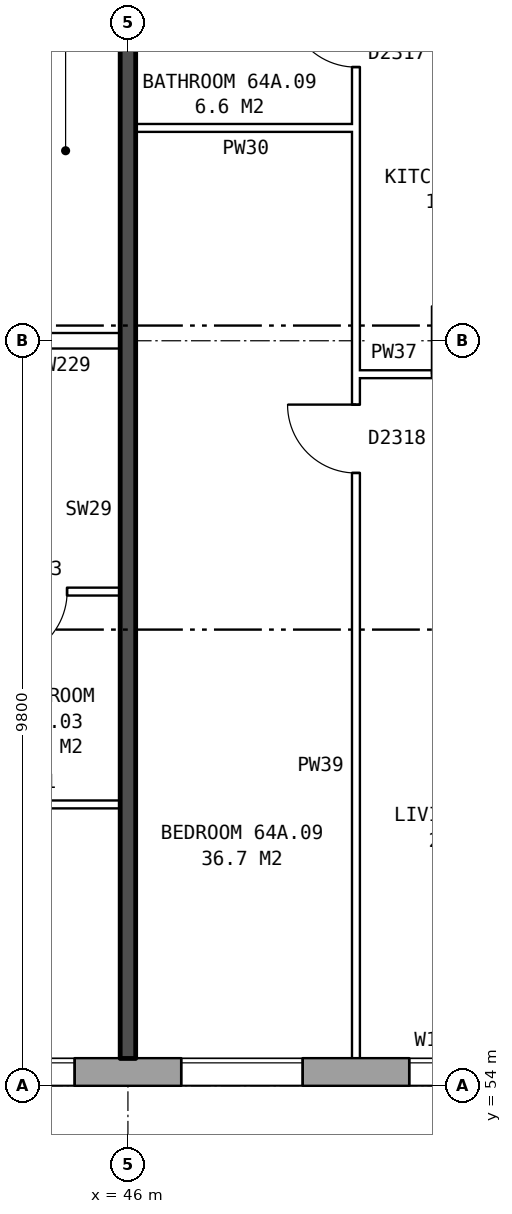
"""IFC4 building model, lengths in metres.
Left out: names, types, materials, properties, quantities, classifications, styles, units other than length and angle.
Written with IfcOpenShell. Run it as: python <this file> out.ifc"""

import sys

from ifc_helpers import new_model, si_unit, direction, frame, frame_2d, origin, place, context, subcontext, project, spatial, rectangle, extrude, element, fill, save


model = new_model("IFC4")
c1 = context("Model", 3, precision=1e-05, world=origin(), true_north=direction((0.0, 1.0)))
c2 = subcontext(c1, "Body", "Model", "MODEL_VIEW")
j1 = project(units=[si_unit("LENGTHUNIT", "METRE"), si_unit("PLANEANGLEUNIT", "RADIAN")], contexts=[c1])
p1 = place(None, origin())
s1 = spatial("IfcSite", under=j1, at=p1, CompositionType="ELEMENT")
p2 = place(p1, origin())
s2 = spatial("IfcBuilding", under=s1, at=p2, CompositionType="ELEMENT")
p3 = place(p2, frame((0.0, 0.0, 227.6)))
s3 = spatial("IfcBuildingStorey", under=s2, at=p3, CompositionType="ELEMENT", Elevation=227.6)
p4 = place(p3, frame((35.075, 54.18, 0.0), z_axis=(0.0, 0.0, 1.0), x_axis=(1.0, 0.0, 0.0)))
e1 = element("IfcWall", 1, at=p4, inside=s3, PredefinedType="STANDARD", context=c2, shape_type="SweptSolid", body=[
    extrude(rectangle(XDim=39.875, YDim=0.36, at=frame_2d((19.938, 0.0))), origin(), (0.0, 0.0, 1.0), 2.85),
])
p5 = place(p4, frame((2.625, 0.0, 0.8)))
e2 = element("IfcOpeningElement", 2, at=p5, cuts=e1, PredefinedType="OPENING", context=c2, shape_type="SweptSolid", body=[
    extrude(rectangle(XDim=1.6, YDim=1.8, at=frame_2d((0.8, 0.9))), frame((0.0, 0.19, 0.0), z_axis=(0.0, -1.0, 0.0), x_axis=(1.0, 0.0, 0.0)), (0.0, 0.0, 1.0), 0.38),
])
p6 = place(p4, frame((5.625, 0.0, 0.8)))
e3 = element("IfcOpeningElement", 3, at=p6, cuts=e1, PredefinedType="OPENING", context=c2, shape_type="SweptSolid", body=[
    extrude(rectangle(XDim=1.6, YDim=1.8, at=frame_2d((0.8, 0.9))), frame((0.0, 0.19, 0.0), z_axis=(0.0, -1.0, 0.0), x_axis=(1.0, 0.0, 0.0)), (0.0, 0.0, 1.0), 0.38),
])
p7 = place(p4, frame((8.625, 0.0, 0.8)))
e4 = element("IfcOpeningElement", 4, at=p7, cuts=e1, PredefinedType="OPENING", context=c2, shape_type="SweptSolid", body=[
    extrude(rectangle(XDim=1.6, YDim=1.8, at=frame_2d((0.8, 0.9))), frame((0.0, 0.19, 0.0), z_axis=(0.0, -1.0, 0.0), x_axis=(1.0, 0.0, 0.0)), (0.0, 0.0, 1.0), 0.38),
])
p8 = place(p4, frame((11.625, 0.0, 0.8)))
e5 = element("IfcOpeningElement", 5, at=p8, cuts=e1, PredefinedType="OPENING", context=c2, shape_type="SweptSolid", body=[
    extrude(rectangle(XDim=1.6, YDim=1.8, at=frame_2d((0.8, 0.9))), frame((0.0, 0.19, 0.0), z_axis=(0.0, -1.0, 0.0), x_axis=(1.0, 0.0, 0.0)), (0.0, 0.0, 1.0), 0.38),
])
p9 = place(p4, frame((14.625, 0.0, 0.35)))
e6 = element("IfcOpeningElement", 6, at=p9, cuts=e1, PredefinedType="OPENING", context=c2, shape_type="SweptSolid", body=[
    extrude(rectangle(XDim=0.6, YDim=0.9, at=frame_2d((0.3, 0.45))), frame((0.0, 0.19, 0.0), z_axis=(0.0, -1.0, 0.0), x_axis=(1.0, 0.0, 0.0)), (0.0, 0.0, 1.0), 0.38),
])
p10 = place(p4, frame((17.625, 0.0, 0.8)))
e7 = element("IfcOpeningElement", 7, at=p10, cuts=e1, PredefinedType="OPENING", context=c2, shape_type="SweptSolid", body=[
    extrude(rectangle(XDim=1.6, YDim=1.8, at=frame_2d((0.8, 0.9))), frame((0.0, 0.19, 0.0), z_axis=(0.0, -1.0, 0.0), x_axis=(1.0, 0.0, 0.0)), (0.0, 0.0, 1.0), 0.38),
])
p11 = place(p4, frame((20.625, 0.0, 0.8)))
e8 = element("IfcOpeningElement", 8, at=p11, cuts=e1, PredefinedType="OPENING", context=c2, shape_type="SweptSolid", body=[
    extrude(rectangle(XDim=1.6, YDim=1.8, at=frame_2d((0.8, 0.9))), frame((0.0, 0.19, 0.0), z_axis=(0.0, -1.0, 0.0), x_axis=(1.0, 0.0, 0.0)), (0.0, 0.0, 1.0), 0.38),
])
p12 = place(p4, frame((24.075, 0.0, 1.7)))
e9 = element("IfcOpeningElement", 9, at=p12, cuts=e1, PredefinedType="OPENING", context=c2, shape_type="SweptSolid", body=[
    extrude(rectangle(XDim=0.6, YDim=0.9, at=frame_2d((0.3, 0.45))), frame((0.0, 0.19, 0.0), z_axis=(0.0, -1.0, 0.0), x_axis=(1.0, 0.0, 0.0)), (0.0, 0.0, 1.0), 0.38),
])
p13 = place(p4, frame((26.625, 0.0, 0.8)))
e10 = element("IfcOpeningElement", 10, at=p13, cuts=e1, PredefinedType="OPENING", context=c2, shape_type="SweptSolid", body=[
    extrude(rectangle(XDim=1.6, YDim=1.8, at=frame_2d((0.8, 0.9))), frame((0.0, 0.19, 0.0), z_axis=(0.0, -1.0, 0.0), x_axis=(1.0, 0.0, 0.0)), (0.0, 0.0, 1.0), 0.38),
])
p14 = place(p4, frame((29.625, 0.0, 0.8)))
e11 = element("IfcOpeningElement", 11, at=p14, cuts=e1, PredefinedType="OPENING", context=c2, shape_type="SweptSolid", body=[
    extrude(rectangle(XDim=1.6, YDim=1.8, at=frame_2d((0.8, 0.9))), frame((0.0, 0.19, 0.0), z_axis=(0.0, -1.0, 0.0), x_axis=(1.0, 0.0, 0.0)), (0.0, 0.0, 1.0), 0.38),
])
p15 = place(p4, frame((32.625, 0.0, 0.8)))
e12 = element("IfcOpeningElement", 12, at=p15, cuts=e1, PredefinedType="OPENING", context=c2, shape_type="SweptSolid", body=[
    extrude(rectangle(XDim=1.6, YDim=1.8, at=frame_2d((0.8, 0.9))), frame((0.0, 0.19, 0.0), z_axis=(0.0, -1.0, 0.0), x_axis=(1.0, 0.0, 0.0)), (0.0, 0.0, 1.0), 0.38),
])
p16 = place(p4, frame((35.625, 0.0, 0.8)))
e13 = element("IfcOpeningElement", 13, at=p16, cuts=e1, PredefinedType="OPENING", context=c2, shape_type="SweptSolid", body=[
    extrude(rectangle(XDim=1.6, YDim=1.8, at=frame_2d((0.8, 0.9))), frame((0.0, 0.19, 0.0), z_axis=(0.0, -1.0, 0.0), x_axis=(1.0, 0.0, 0.0)), (0.0, 0.0, 1.0), 0.38),
])
p17 = place(p4, frame((15.525, 0.0, 0.75)))
e14 = element("IfcOpeningElement", 14, at=p17, cuts=e1, PredefinedType="OPENING", context=c2, shape_type="SweptSolid", body=[
    extrude(rectangle(XDim=1.2, YDim=1.8, at=frame_2d((0.6, 0.9))), frame((0.0, 0.19, 0.0), z_axis=(0.0, -1.0, 0.0), x_axis=(1.0, 0.0, 0.0)), (0.0, 0.0, 1.0), 0.38),
])
p18 = place(p4, frame((24.975, 0.0, 0.8)))
e15 = element("IfcOpeningElement", 15, at=p18, cuts=e1, PredefinedType="OPENING", context=c2, shape_type="SweptSolid", body=[
    extrude(rectangle(XDim=0.8, YDim=1.8, at=frame_2d((0.4, 0.9))), frame((0.0, 0.19, 0.0), z_axis=(0.0, -1.0, 0.0), x_axis=(1.0, 0.0, 0.0)), (0.0, 0.0, 1.0), 0.38),
])
p19 = place(p3, frame((43.6, 57.7, 0.0), z_axis=(0.0, 0.0, 1.0), x_axis=(1.0, 0.0, 0.0)))
e16 = element("IfcWall", 16, at=p19, inside=s3, PredefinedType="PARTITIONING", context=c2, shape_type="SweptSolid", body=[
    extrude(rectangle(XDim=2.3, YDim=0.1, at=frame_2d((1.15, 0.0))), origin(), (0.0, 0.0, 1.0), 2.85),
])
p20 = place(p3, frame((40.1, 60.5, 0.0), z_axis=(0.0, 0.0, 1.0), x_axis=(1.0, 0.0, 0.0)))
e17 = element("IfcWall", 17, at=p20, inside=s3, PredefinedType="PARTITIONING", context=c2, shape_type="SweptSolid", body=[
    extrude(rectangle(XDim=5.8, YDim=0.1, at=frame_2d((2.9, 0.0))), origin(), (0.0, 0.0, 1.0), 2.85),
])
p21 = place(p20, frame((1.3, 0.0, 0.0)))
e18 = element("IfcOpeningElement", 18, at=p21, cuts=e17, PredefinedType="OPENING", context=c2, shape_type="SweptSolid", body=[
    extrude(rectangle(XDim=0.9, YDim=2.1, at=frame_2d((0.45, 1.05))), frame((0.0, 0.06, 0.0), z_axis=(0.0, -1.0, 0.0), x_axis=(1.0, 0.0, 0.0)), (0.0, 0.0, 1.0), 0.12),
])
p22 = place(p20, frame((4.2, 0.0, 0.0)))
e19 = element("IfcOpeningElement", 19, at=p22, cuts=e17, PredefinedType="OPENING", context=c2, shape_type="SweptSolid", body=[
    extrude(rectangle(XDim=0.9, YDim=2.1, at=frame_2d((0.45, 1.05))), frame((0.0, 0.06, 0.0), z_axis=(0.0, -1.0, 0.0), x_axis=(1.0, 0.0, 0.0)), (0.0, 0.0, 1.0), 0.12),
])
p23 = place(p3, frame((49.0, 63.36, 0.0), z_axis=(0.0, 0.0, 1.0), x_axis=(1.0, 0.0, 0.0)))
e20 = element("IfcWall", 20, at=p23, inside=s3, PredefinedType="PARTITIONING", context=c2, shape_type="SweptSolid", body=[
    extrude(rectangle(XDim=2.9, YDim=0.1, at=frame_2d((1.45, 0.0))), origin(), (0.0, 0.0, 1.0), 2.85),
])
p24 = place(p23, frame((1.0, 0.0, 0.0)))
e21 = element("IfcOpeningElement", 21, at=p24, cuts=e20, PredefinedType="OPENING", context=c2, shape_type="SweptSolid", body=[
    extrude(rectangle(XDim=0.9, YDim=2.1, at=frame_2d((0.45, 1.05))), frame((0.0, 0.06, 0.0), z_axis=(0.0, -1.0, 0.0), x_axis=(1.0, 0.0, 0.0)), (0.0, 0.0, 1.0), 0.12),
])
p25 = place(p3, frame((44.36, 63.8, 0.0), z_axis=(0.0, 0.0, 1.0), x_axis=(1.0, 0.0, 0.0)))
e22 = element("IfcWall", 22, at=p25, inside=s3, PredefinedType="PARTITIONING", context=c2, shape_type="SweptSolid", body=[
    extrude(rectangle(XDim=1.54, YDim=0.2, at=frame_2d((0.77, 0.0))), origin(), (0.0, 0.0, 1.0), 2.85),
])
p26 = place(p3, frame((46.1, 66.6, 0.0), z_axis=(0.0, 0.0, 1.0), x_axis=(1.0, 0.0, 0.0)))
e23 = element("IfcWall", 23, at=p26, inside=s3, PredefinedType="PARTITIONING", context=c2, shape_type="SweptSolid", body=[
    extrude(rectangle(XDim=2.9, YDim=0.1, at=frame_2d((1.45, 0.0))), origin(), (0.0, 0.0, 1.0), 2.85),
])
p27 = place(p3, frame((46.0, 54.36, 0.0), z_axis=(0.0, 0.0, 1.0), x_axis=(0.0, 1.0, 0.0)))
e24 = element("IfcWall", 24, at=p27, inside=s3, PredefinedType="SOLIDWALL", context=c2, shape_type="SweptSolid", body=[
    extrude(rectangle(XDim=14.44, YDim=0.2, at=frame_2d((7.22, 0.0))), origin(), (0.0, 0.0, 1.0), 2.85),
])
p28 = place(p3, frame((49.0, 54.36, 0.0), z_axis=(0.0, 0.0, 1.0), x_axis=(0.0, 1.0, 0.0)))
e25 = element("IfcWall", 25, at=p28, inside=s3, PredefinedType="PARTITIONING", context=c2, shape_type="SweptSolid", body=[
    extrude(rectangle(XDim=14.34, YDim=0.1, at=frame_2d((7.17, 0.0))), origin(), (0.0, 0.0, 1.0), 2.85),
])
p29 = place(p28, frame((7.7, 0.0, 0.0)))
e26 = element("IfcOpeningElement", 26, at=p29, cuts=e25, PredefinedType="OPENING", context=c2, shape_type="SweptSolid", body=[
    extrude(rectangle(XDim=0.9, YDim=2.1, at=frame_2d((0.45, 1.05))), frame((0.0, 0.06, 0.0), z_axis=(0.0, -1.0, 0.0), x_axis=(1.0, 0.0, 0.0)), (0.0, 0.0, 1.0), 0.12),
])
p30 = place(p28, frame((13.04, 0.0, 0.0)))
e27 = element("IfcOpeningElement", 27, at=p30, cuts=e25, PredefinedType="OPENING", context=c2, shape_type="SweptSolid", body=[
    extrude(rectangle(XDim=0.9, YDim=2.1, at=frame_2d((0.45, 1.05))), frame((0.0, 0.06, 0.0), z_axis=(0.0, -1.0, 0.0), x_axis=(1.0, 0.0, 0.0)), (0.0, 0.0, 1.0), 0.12),
])
p31 = place(p7, origin())
e28 = element("IfcWindow", 28, at=p31, inside=s3, PartitioningType="SINGLE_PANEL", PredefinedType="WINDOW", context=c2, shape_type="SweptSolid", body=[
    extrude(rectangle(XDim=1.6, YDim=1.8, at=frame_2d((0.8, 0.9))), frame((0.0, 0.15, 0.0), z_axis=(0.0, -1.0, 0.0), x_axis=(1.0, 0.0, 0.0)), (0.0, 0.0, 1.0), 0.06),
])
fill(e4, e28)
p32 = place(p8, origin())
e29 = element("IfcWindow", 29, at=p32, inside=s3, PartitioningType="SINGLE_PANEL", PredefinedType="WINDOW", context=c2, shape_type="SweptSolid", body=[
    extrude(rectangle(XDim=1.6, YDim=1.8, at=frame_2d((0.8, 0.9))), frame((0.0, 0.15, 0.0), z_axis=(0.0, -1.0, 0.0), x_axis=(1.0, 0.0, 0.0)), (0.0, 0.0, 1.0), 0.06),
])
fill(e5, e29)
p33 = place(p9, origin())
e30 = element("IfcWindow", 30, at=p33, inside=s3, PartitioningType="SINGLE_PANEL", PredefinedType="WINDOW", context=c2, shape_type="SweptSolid", body=[
    extrude(rectangle(XDim=0.6, YDim=0.9, at=frame_2d((0.3, 0.45))), frame((0.0, 0.15, 0.0), z_axis=(0.0, -1.0, 0.0), x_axis=(1.0, 0.0, 0.0)), (0.0, 0.0, 1.0), 0.06),
])
fill(e6, e30)
p34 = place(p22, frame((0.9, 0.0, 0.0), z_axis=(0.0, 0.0, 1.0), x_axis=(-1.0, 0.0, 0.0)))
e31 = element("IfcDoor", 31, at=p34, inside=s3, OperationType="SINGLE_SWING_RIGHT", PredefinedType="DOOR", context=c2, shape_type="SweptSolid", body=[
    extrude(rectangle(XDim=0.9, YDim=2.1, at=frame_2d((0.45, 1.05))), frame((0.0, 0.025, 0.0), z_axis=(0.0, -1.0, 0.0), x_axis=(1.0, 0.0, 0.0)), (0.0, 0.0, 1.0), 0.05),
])
fill(e19, e31)
p35 = place(p29, origin())
e32 = element("IfcDoor", 32, at=p35, inside=s3, OperationType="SINGLE_SWING_RIGHT", PredefinedType="DOOR", context=c2, shape_type="SweptSolid", body=[
    extrude(rectangle(XDim=0.9, YDim=2.1, at=frame_2d((0.45, 1.05))), frame((0.0, 0.025, 0.0), z_axis=(0.0, -1.0, 0.0), x_axis=(1.0, 0.0, 0.0)), (0.0, 0.0, 1.0), 0.05),
])
fill(e26, e32)
p36 = place(p30, origin())
e33 = element("IfcDoor", 33, at=p36, inside=s3, OperationType="SINGLE_SWING_RIGHT", PredefinedType="DOOR", context=c2, shape_type="SweptSolid", body=[
    extrude(rectangle(XDim=0.9, YDim=2.1, at=frame_2d((0.45, 1.05))), frame((0.0, 0.025, 0.0), z_axis=(0.0, -1.0, 0.0), x_axis=(1.0, 0.0, 0.0)), (0.0, 0.0, 1.0), 0.05),
])
fill(e27, e33)
save(model, sys.argv[1])
